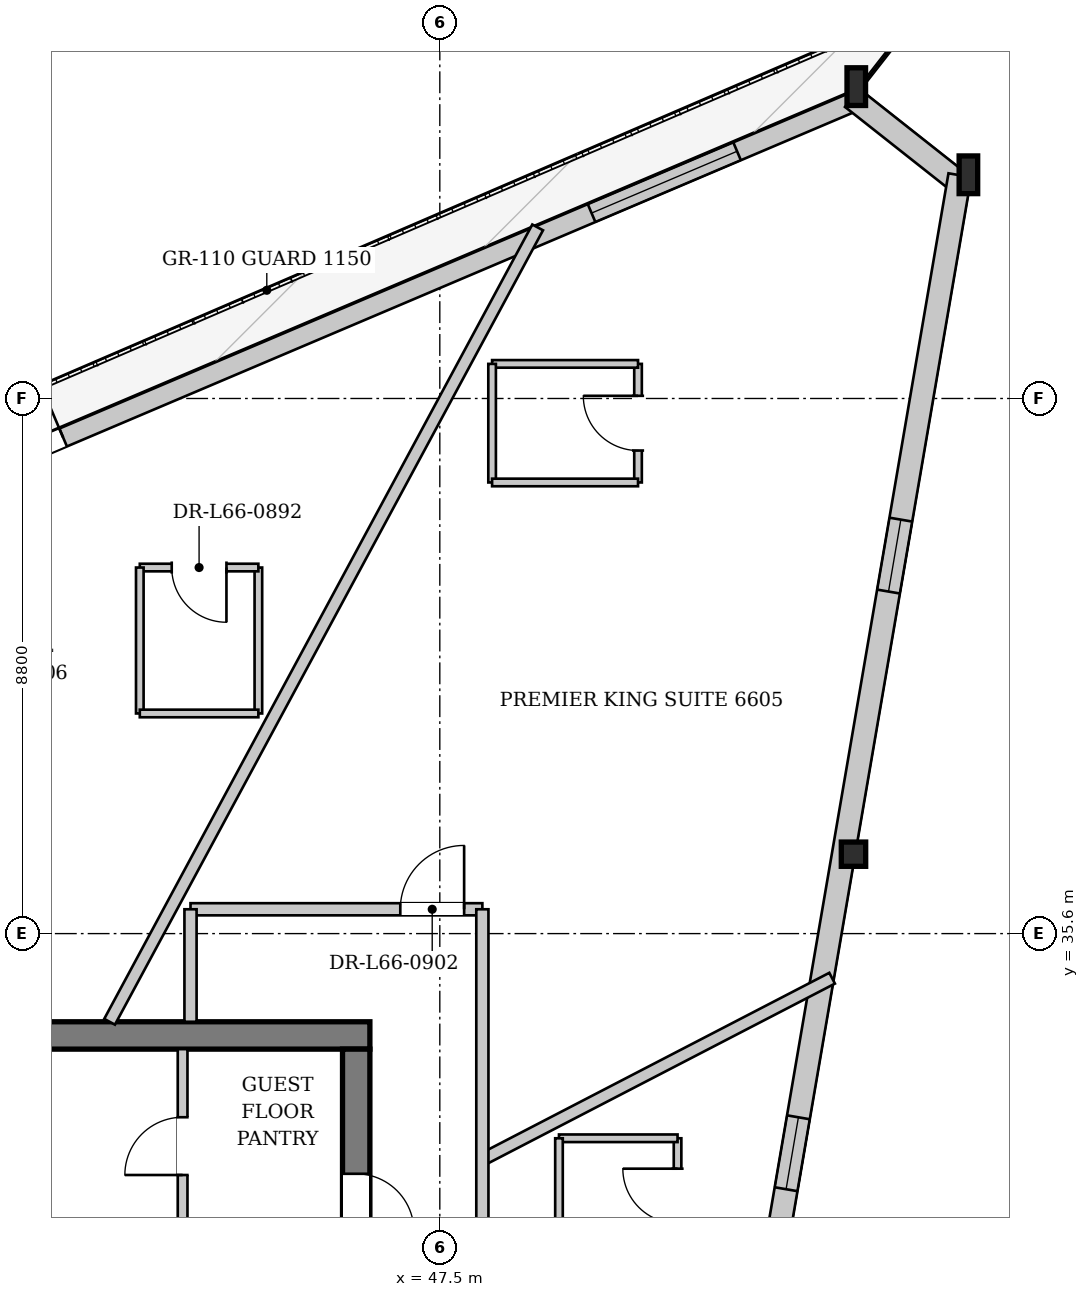
"""IFC4 building model, lengths in metres.
Left out: names, types, materials, properties, quantities, classifications, styles, units other than length and angle.
Written with IfcOpenShell. Run it as: python <this file> out.ifc"""

import sys

from ifc_helpers import new_model, si_unit, direction, frame, frame_2d, origin, origin_2d, place, context, subcontext, project, spatial, rectangle, i_section, extrude, source, transform, mapped, element, fill, save


model = new_model("IFC4")
c1 = context("Model", 3, precision=1e-05, world=origin(), true_north=direction((0.0, 1.0)))
c2 = subcontext(c1, "Body", "Model", "MODEL_VIEW")
j1 = project(units=[si_unit("LENGTHUNIT", "METRE"), si_unit("PLANEANGLEUNIT", "RADIAN")], contexts=[c1])
p1 = place(None, origin())
s1 = spatial("IfcSite", under=j1, at=p1, CompositionType="ELEMENT")
p2 = place(p1, origin())
s2 = spatial("IfcBuilding", under=s1, at=p2, CompositionType="ELEMENT")
p3 = place(p2, frame((0.0, 0.0, 248.9)))
s3 = spatial("IfcBuildingStorey", under=s2, at=p3, CompositionType="ELEMENT", Elevation=248.9)
m1 = source(origin(), c2, "Body", "SweptSolid", [
    extrude(i_section(OverallWidth=0.305, OverallDepth=0.62, WebThickness=0.021, FlangeThickness=0.04, at=origin_2d()), origin(), (0.0, 0.0, 1.0), 3.437),
])
for number, where, z_axis, x_axis in (
    (1, (56.24, 48.039, 0.0), (-0.027, 0.023, 0.999), (-0.646, -0.763, 0.0)),
    (2, (54.399, 49.493, 0.0), (-0.029, 0.021, 0.999), (-0.58, -0.815, 0.0)),
):
    element("IfcColumn", number, at=place(p3, frame(where, z_axis=z_axis, x_axis=x_axis)), inside=s3, PredefinedType="COLUMN", context=c2, shape_type="MappedRepresentation", body=[
        mapped(m1, transform((0.0, 0.0, 0.0), x_axis=(1.0, 0.0, 0.0), y_axis=(0.0, 1.0, 0.0), z_axis=(0.0, 0.0, 1.0), scale=1.0)),
    ])
m2 = source(origin(), c2, "Body", "SweptSolid", [
    extrude(i_section(OverallWidth=0.401, OverallDepth=0.399, WebThickness=0.022, FlangeThickness=0.034, at=origin_2d()), origin(), (0.0, 0.0, 1.0), 3.436),
])
p4 = place(p3, frame((54.326, 36.87, 0.0), z_axis=(-0.013073556302, 0.020676113499, 0.999700745451), x_axis=(-0.8452127177, -0.534430034559, 0.0)))
e3 = element("IfcColumn", 3, at=p4, inside=s3, PredefinedType="COLUMN", context=c2, shape_type="MappedRepresentation", body=[
    mapped(m2, transform((0.0, 0.0, 0.0), x_axis=(1.0, 0.0, 0.0), y_axis=(0.0, 1.0, 0.0), z_axis=(0.0, 0.0, 1.0), scale=1.0)),
])
p5 = place(p3, frame((34.098, 40.698, 0.0), z_axis=(0.0, 0.0, 1.0), x_axis=(0.920439131347, 0.390885923877, 0.0)))
e4 = element("IfcWall", 4, at=p5, inside=s3, PredefinedType="SOLIDWALL", context=c2, shape_type="SweptSolid", body=[
    extrude(rectangle(XDim=22.124, YDim=0.32, at=frame_2d((11.062, 0.0))), origin(), (0.0, 0.0, 1.0), 2.872),
])
p6 = place(p5, frame((6.33, 0.0, 0.0)))
e5 = element("IfcOpeningElement", 5, at=p6, cuts=e4, PredefinedType="OPENING", context=c2, shape_type="SweptSolid", body=[
    extrude(rectangle(XDim=1.5, YDim=2.3, at=frame_2d((0.75, 1.15))), frame((0.0, 0.17, 0.0), z_axis=(0.0, -1.0, 0.0), x_axis=(1.0, 0.0, 0.0)), (0.0, 0.0, 1.0), 0.34),
])
p7 = place(p5, frame((17.272, 0.0, 0.402)))
e6 = element("IfcOpeningElement", 6, at=p7, cuts=e4, PredefinedType="OPENING", context=c2, shape_type="SweptSolid", body=[
    extrude(rectangle(XDim=2.6, YDim=2.35, at=frame_2d((1.3, 1.175))), frame((0.0, 0.17, 0.0), z_axis=(0.0, -1.0, 0.0), x_axis=(1.0, 0.0, 0.0)), (0.0, 0.0, 1.0), 0.34),
])
p8 = place(p3, frame((54.281, 49.344, 0.0), z_axis=(0.0, 0.0, 1.0), x_axis=(0.784802840653, -0.619745513339, 0.0)))
e7 = element("IfcWall", 7, at=p8, inside=s3, PredefinedType="SOLIDWALL", context=c2, shape_type="SweptSolid", body=[
    extrude(rectangle(XDim=2.346, YDim=0.38, at=frame_2d((1.173, 0.0))), origin(), (0.0, 0.0, 1.0), 2.872),
])
p9 = place(p3, frame((56.053, 48.071, 0.0), z_axis=(0.0, 0.0, 1.0), x_axis=(-0.168923450159, -0.985629173668, 0.0)))
e8 = element("IfcWall", 8, at=p9, inside=s3, PredefinedType="SOLIDWALL", context=c2, shape_type="SweptSolid", body=[
    extrude(rectangle(XDim=22.663, YDim=0.38, at=frame_2d((11.332, 0.0))), origin(), (0.0, 0.0, 1.0), 2.872),
])
p10 = place(p9, frame((5.746, 0.0, 0.65)))
e9 = element("IfcOpeningElement", 9, at=p10, cuts=e8, PredefinedType="OPENING", context=c2, shape_type="SweptSolid", body=[
    extrude(rectangle(XDim=1.2, YDim=1.5, at=frame_2d((0.6, 0.75))), frame((0.0, 0.2, 0.0), z_axis=(0.0, -1.0, 0.0), x_axis=(1.0, 0.0, 0.0)), (0.0, 0.0, 1.0), 0.4),
])
p11 = place(p9, frame((15.718, 0.0, 0.65)))
e10 = element("IfcOpeningElement", 10, at=p11, cuts=e8, PredefinedType="OPENING", context=c2, shape_type="SweptSolid", body=[
    extrude(rectangle(XDim=1.2, YDim=1.5, at=frame_2d((0.6, 0.75))), frame((0.0, 0.2, 0.0), z_axis=(0.0, -1.0, 0.0), x_axis=(1.0, 0.0, 0.0)), (0.0, 0.0, 1.0), 0.4),
])
p12 = place(p3, frame((29.65, 33.925, 0.0), z_axis=(0.0, 0.0, 1.0), x_axis=(1.0, 0.0, 0.0)))
e11 = element("IfcWall", 11, at=p12, inside=s3, PredefinedType="SHEAR", context=c2, shape_type="SweptSolid", body=[
    extrude(rectangle(XDim=16.7, YDim=0.45, at=frame_2d((8.35, 0.0))), origin(), (0.0, 0.0, 1.0), 3.38),
])
p13 = place(p12, frame((1.45, 0.0, 0.0)))
e12 = element("IfcOpeningElement", 12, at=p13, cuts=e11, PredefinedType="OPENING", context=c2, shape_type="SweptSolid", body=[
    extrude(rectangle(XDim=0.95, YDim=2.1, at=frame_2d((0.475, 1.05))), frame((0.0, 0.235, 0.0), z_axis=(0.0, -1.0, 0.0), x_axis=(1.0, 0.0, 0.0)), (0.0, 0.0, 1.0), 0.47),
])
p14 = place(p12, frame((3.83, 0.0, 0.0)))
e13 = element("IfcOpeningElement", 13, at=p14, cuts=e11, PredefinedType="OPENING", context=c2, shape_type="SweptSolid", body=[
    extrude(rectangle(XDim=1.32, YDim=2.2, at=frame_2d((0.66, 1.1))), frame((0.0, 0.235, 0.0), z_axis=(0.0, -1.0, 0.0), x_axis=(1.0, 0.0, 0.0)), (0.0, 0.0, 1.0), 0.47),
])
p15 = place(p3, frame((46.125, 33.7, 0.0), z_axis=(0.0, 0.0, 1.0), x_axis=(0.0, -1.0, 0.0)))
e14 = element("IfcWall", 14, at=p15, inside=s3, PredefinedType="SHEAR", context=c2, shape_type="SweptSolid", body=[
    extrude(rectangle(XDim=14.2, YDim=0.45, at=frame_2d((7.1, 0.0))), origin(), (0.0, 0.0, 1.0), 3.38),
])
p16 = place(p15, frame((5.18, 0.0, 0.0)))
e15 = element("IfcOpeningElement", 15, at=p16, cuts=e14, PredefinedType="OPENING", context=c2, shape_type="SweptSolid", body=[
    extrude(rectangle(XDim=1.6, YDim=2.2, at=frame_2d((0.8, 1.1))), frame((0.0, 0.235, 0.0), z_axis=(0.0, -1.0, 0.0), x_axis=(1.0, 0.0, 0.0)), (0.0, 0.0, 1.0), 0.47),
])
p17 = place(p15, frame((2.05, 0.0, 0.0)))
e16 = element("IfcOpeningElement", 16, at=p17, cuts=e14, PredefinedType="OPENING", context=c2, shape_type="SweptSolid", body=[
    extrude(rectangle(XDim=0.95, YDim=2.1, at=frame_2d((0.475, 1.05))), frame((0.0, 0.235, 0.0), z_axis=(0.0, -1.0, 0.0), x_axis=(1.0, 0.0, 0.0)), (0.0, 0.0, 1.0), 0.47),
])
p18 = place(p3, frame((43.27, 30.68, 0.0), z_axis=(0.0, 0.0, 1.0), x_axis=(0.0, 1.0, 0.0)))
e17 = element("IfcWall", 17, at=p18, inside=s3, PredefinedType="PARTITIONING", context=c2, shape_type="SweptSolid", body=[
    extrude(rectangle(XDim=3.02, YDim=0.16, at=frame_2d((1.51, 0.0))), origin(), (0.0, 0.0, 1.0), 3.38),
])
p19 = place(p18, frame((0.95, 0.0, 0.0)))
e18 = element("IfcOpeningElement", 18, at=p19, cuts=e17, PredefinedType="OPENING", context=c2, shape_type="SweptSolid", body=[
    extrude(rectangle(XDim=0.95, YDim=2.1, at=frame_2d((0.475, 1.05))), frame((0.0, 0.09, 0.0), z_axis=(0.0, -1.0, 0.0), x_axis=(1.0, 0.0, 0.0)), (0.0, 0.0, 1.0), 0.18),
])
p20 = place(p3, frame((48.2, 31.885, 0.0), z_axis=(0.0, 0.0, 1.0), x_axis=(0.887874845761, 0.460085055468, 0.0)))
e19 = element("IfcWall", 19, at=p20, inside=s3, PredefinedType="PARTITIONING", context=c2, shape_type="SweptSolid", body=[
    extrude(rectangle(XDim=6.479, YDim=0.2, at=frame_2d((3.239, 0.0))), origin(), (0.0, 0.0, 1.0), 3.38),
])
p21 = place(p3, frame((42.069, 34.15, 0.0), z_axis=(0.0, 0.0, 1.0), x_axis=(0.474411767959, 0.880303058283, 0.0)))
e20 = element("IfcWall", 20, at=p21, inside=s3, PredefinedType="PARTITIONING", context=c2, shape_type="SweptSolid", body=[
    extrude(rectangle(XDim=14.84, YDim=0.2, at=frame_2d((7.42, 0.0))), origin(), (0.0, 0.0, 1.0), 3.38),
])
p22 = place(p3, frame((51.41, 30.334, 0.0), z_axis=(0.0, 0.0, 1.0), x_axis=(0.0, 1.0, 0.0)))
e21 = element("IfcWall", 21, at=p22, inside=s3, PredefinedType="PARTITIONING", context=c2, shape_type="SweptSolid", body=[
    extrude(rectangle(XDim=1.9, YDim=0.125, at=frame_2d((0.95, 0.0))), origin(), (0.0, 0.0, 1.0), 3.38),
])
p23 = place(p22, frame((0.5, 0.0, 0.0)))
e22 = element("IfcOpeningElement", 22, at=p23, cuts=e21, PredefinedType="OPENING", context=c2, shape_type="SweptSolid", body=[
    extrude(rectangle(XDim=0.9, YDim=2.1, at=frame_2d((0.45, 1.05))), frame((0.0, 0.073, 0.0), z_axis=(0.0, -1.0, 0.0), x_axis=(1.0, 0.0, 0.0)), (0.0, 0.0, 1.0), 0.145),
])
p24 = place(p3, frame((51.41, 32.234, 0.0), z_axis=(0.0, 0.0, 1.0), x_axis=(-1.0, 0.0, 0.0)))
e23 = element("IfcWall", 23, at=p24, inside=s3, PredefinedType="PARTITIONING", context=c2, shape_type="SweptSolid", body=[
    extrude(rectangle(XDim=1.95, YDim=0.125, at=frame_2d((0.975, 0.0))), origin(), (0.0, 0.0, 1.0), 3.38),
])
p25 = place(p3, frame((49.46, 32.234, 0.0), z_axis=(0.0, 0.0, 1.0), x_axis=(0.0, -1.0, 0.0)))
e24 = element("IfcWall", 24, at=p25, inside=s3, PredefinedType="PARTITIONING", context=c2, shape_type="SweptSolid", body=[
    extrude(rectangle(XDim=1.9, YDim=0.125, at=frame_2d((0.95, 0.0))), origin(), (0.0, 0.0, 1.0), 3.38),
])
p26 = place(p3, frame((50.76, 43.019, 0.0), z_axis=(0.0, 0.0, 1.0), x_axis=(0.0, 1.0, 0.0)))
e25 = element("IfcWall", 25, at=p26, inside=s3, PredefinedType="PARTITIONING", context=c2, shape_type="SweptSolid", body=[
    extrude(rectangle(XDim=1.95, YDim=0.125, at=frame_2d((0.975, 0.0))), origin(), (0.0, 0.0, 1.0), 3.38),
])
p27 = place(p26, frame((0.525, 0.0, 0.0)))
e26 = element("IfcOpeningElement", 26, at=p27, cuts=e25, PredefinedType="OPENING", context=c2, shape_type="SweptSolid", body=[
    extrude(rectangle(XDim=0.9, YDim=2.1, at=frame_2d((0.45, 1.05))), frame((0.0, 0.073, 0.0), z_axis=(0.0, -1.0, 0.0), x_axis=(1.0, 0.0, 0.0)), (0.0, 0.0, 1.0), 0.145),
])
p28 = place(p3, frame((50.76, 44.969, 0.0), z_axis=(0.0, 0.0, 1.0), x_axis=(-1.0, 0.0, 0.0)))
e27 = element("IfcWall", 27, at=p28, inside=s3, PredefinedType="PARTITIONING", context=c2, shape_type="SweptSolid", body=[
    extrude(rectangle(XDim=2.4, YDim=0.125, at=frame_2d((1.2, 0.0))), origin(), (0.0, 0.0, 1.0), 3.38),
])
p29 = place(p3, frame((48.36, 44.969, 0.0), z_axis=(0.0, 0.0, 1.0), x_axis=(0.0, -1.0, 0.0)))
e28 = element("IfcWall", 28, at=p29, inside=s3, PredefinedType="PARTITIONING", context=c2, shape_type="SweptSolid", body=[
    extrude(rectangle(XDim=1.95, YDim=0.125, at=frame_2d((0.975, 0.0))), origin(), (0.0, 0.0, 1.0), 3.38),
])
p30 = place(p3, frame((48.36, 43.019, 0.0), z_axis=(0.0, 0.0, 1.0), x_axis=(1.0, 0.0, 0.0)))
e29 = element("IfcWall", 29, at=p30, inside=s3, PredefinedType="PARTITIONING", context=c2, shape_type="SweptSolid", body=[
    extrude(rectangle(XDim=2.4, YDim=0.125, at=frame_2d((1.2, 0.0))), origin(), (0.0, 0.0, 1.0), 3.125),
])
p31 = place(p3, frame((44.516, 39.22, 0.0), z_axis=(0.0, 0.0, 1.0), x_axis=(0.0, 1.0, 0.0)))
e30 = element("IfcWall", 30, at=p31, inside=s3, PredefinedType="PARTITIONING", context=c2, shape_type="SweptSolid", body=[
    extrude(rectangle(XDim=2.4, YDim=0.125, at=frame_2d((1.2, 0.0))), origin(), (0.0, 0.0, 1.0), 3.38),
])
p32 = place(p3, frame((44.516, 41.62, 0.0), z_axis=(0.0, 0.0, 1.0), x_axis=(-1.0, 0.0, 0.0)))
e31 = element("IfcWall", 31, at=p32, inside=s3, PredefinedType="PARTITIONING", context=c2, shape_type="SweptSolid", body=[
    extrude(rectangle(XDim=1.95, YDim=0.125, at=frame_2d((0.975, 0.0))), origin(), (0.0, 0.0, 1.0), 3.125),
])
p33 = place(p32, frame((0.525, 0.0, 0.0)))
e32 = element("IfcOpeningElement", 32, at=p33, cuts=e31, PredefinedType="OPENING", context=c2, shape_type="SweptSolid", body=[
    extrude(rectangle(XDim=0.9, YDim=2.1, at=frame_2d((0.45, 1.05))), frame((0.0, 0.073, 0.0), z_axis=(0.0, -1.0, 0.0), x_axis=(1.0, 0.0, 0.0)), (0.0, 0.0, 1.0), 0.145),
])
p34 = place(p3, frame((42.566, 41.62, 0.0), z_axis=(0.0, 0.0, 1.0), x_axis=(0.0, -1.0, 0.0)))
e33 = element("IfcWall", 33, at=p34, inside=s3, PredefinedType="PARTITIONING", context=c2, shape_type="SweptSolid", body=[
    extrude(rectangle(XDim=2.4, YDim=0.125, at=frame_2d((1.2, 0.0))), origin(), (0.0, 0.0, 1.0), 3.38),
])
p35 = place(p3, frame((42.566, 39.22, 0.0), z_axis=(0.0, 0.0, 1.0), x_axis=(1.0, 0.0, 0.0)))
e34 = element("IfcWall", 34, at=p35, inside=s3, PredefinedType="PARTITIONING", context=c2, shape_type="SweptSolid", body=[
    extrude(rectangle(XDim=1.95, YDim=0.125, at=frame_2d((0.975, 0.0))), origin(), (0.0, 0.0, 1.0), 3.38),
])
p36 = place(p3, frame((43.4, 36.0, 0.0), z_axis=(0.0, 0.0, 1.0), x_axis=(1.0, 0.0, 0.0)))
e35 = element("IfcWall", 35, at=p36, inside=s3, PredefinedType="PARTITIONING", context=c2, shape_type="SweptSolid", body=[
    extrude(rectangle(XDim=4.8, YDim=0.2, at=frame_2d((2.4, 0.0))), origin(), (0.0, 0.0, 1.0), 3.38),
])
p37 = place(p36, frame((3.45, 0.0, 0.0)))
e36 = element("IfcOpeningElement", 36, at=p37, cuts=e35, PredefinedType="OPENING", context=c2, shape_type="SweptSolid", body=[
    extrude(rectangle(XDim=1.05, YDim=2.2, at=frame_2d((0.525, 1.1))), frame((0.0, 0.11, 0.0), z_axis=(0.0, -1.0, 0.0), x_axis=(1.0, 0.0, 0.0)), (0.0, 0.0, 1.0), 0.22),
])
p38 = place(p3, frame((43.4, 34.15, 0.0), z_axis=(0.0, 0.0, 1.0), x_axis=(0.0, 1.0, 0.0)))
e37 = element("IfcWall", 37, at=p38, inside=s3, PredefinedType="PARTITIONING", context=c2, shape_type="SweptSolid", body=[
    extrude(rectangle(XDim=1.85, YDim=0.2, at=frame_2d((0.925, 0.0))), origin(), (0.0, 0.0, 1.0), 3.38),
])
p39 = place(p3, frame((48.2, 17.2, 0.0), z_axis=(0.0, 0.0, 1.0), x_axis=(0.0, 1.0, 0.0)))
e38 = element("IfcWall", 38, at=p39, inside=s3, PredefinedType="PARTITIONING", context=c2, shape_type="SweptSolid", body=[
    extrude(rectangle(XDim=18.8, YDim=0.2, at=frame_2d((9.4, 0.0))), origin(), (0.0, 0.0, 1.0), 3.065),
])
p40 = place(p39, frame((3.537, 0.0, 0.0)))
e39 = element("IfcOpeningElement", 39, at=p40, cuts=e38, PredefinedType="OPENING", context=c2, shape_type="SweptSolid", body=[
    extrude(rectangle(XDim=1.05, YDim=2.2, at=frame_2d((0.525, 1.1))), frame((0.0, 0.11, 0.0), z_axis=(0.0, -1.0, 0.0), x_axis=(1.0, 0.0, 0.0)), (0.0, 0.0, 1.0), 0.22),
])
p41 = place(p39, frame((10.296, 0.0, 0.0)))
e40 = element("IfcOpeningElement", 40, at=p41, cuts=e38, PredefinedType="OPENING", context=c2, shape_type="SweptSolid", body=[
    extrude(rectangle(XDim=1.05, YDim=2.2, at=frame_2d((0.525, 1.1))), frame((0.0, 0.11, 0.0), z_axis=(0.0, -1.0, 0.0), x_axis=(1.0, 0.0, 0.0)), (0.0, 0.0, 1.0), 0.22),
])
m3 = source(origin(), c2, "Body", "SweptSolid", [
    extrude(rectangle(XDim=1.5, YDim=2.3, at=frame_2d((0.75, 1.15))), frame((0.0, 0.025, 0.0), z_axis=(0.0, -1.0, 0.0), x_axis=(1.0, 0.0, 0.0)), (0.0, 0.0, 1.0), 0.05),
])
p42 = place(p6, origin())
e41 = element("IfcDoor", 41, at=p42, inside=s3, OperationType="DOUBLE_DOOR_SINGLE_SWING", PredefinedType="DOOR", context=c2, shape_type="MappedRepresentation", body=[
    mapped(m3, transform((0.0, 0.0, 0.0), x_axis=(1.0, 0.0, 0.0), y_axis=(0.0, 1.0, 0.0), z_axis=(0.0, 0.0, 1.0), scale=1.0)),
])
fill(e5, e41)
m4 = source(origin(), c2, "Body", "SweptSolid", [
    extrude(rectangle(XDim=2.6, YDim=2.35, at=frame_2d((1.3, 1.175))), frame((0.0, 0.03, 0.0), z_axis=(0.0, -1.0, 0.0), x_axis=(1.0, 0.0, 0.0)), (0.0, 0.0, 1.0), 0.06),
])
p43 = place(p7, origin())
e42 = element("IfcWindow", 42, at=p43, inside=s3, PartitioningType="SINGLE_PANEL", PredefinedType="WINDOW", context=c2, shape_type="MappedRepresentation", body=[
    mapped(m4, transform((0.0, 0.0, 0.0), x_axis=(1.0, 0.0, 0.0), y_axis=(0.0, 1.0, 0.0), z_axis=(0.0, 0.0, 1.0), scale=1.0)),
])
fill(e6, e42)
m5 = source(origin(), c2, "Body", "SweptSolid", [
    extrude(rectangle(XDim=1.2, YDim=1.5, at=frame_2d((0.6, 0.75))), frame((0.0, 0.03, 0.0), z_axis=(0.0, -1.0, 0.0), x_axis=(1.0, 0.0, 0.0)), (0.0, 0.0, 1.0), 0.06),
])
p44 = place(p10, origin())
e43 = element("IfcWindow", 43, at=p44, inside=s3, PartitioningType="SINGLE_PANEL", PredefinedType="WINDOW", context=c2, shape_type="MappedRepresentation", body=[
    mapped(m5, transform((0.0, 0.0, 0.0), x_axis=(1.0, 0.0, 0.0), y_axis=(0.0, 1.0, 0.0), z_axis=(0.0, 0.0, 1.0), scale=1.0)),
])
fill(e9, e43)
p45 = place(p11, origin())
e44 = element("IfcWindow", 44, at=p45, inside=s3, PartitioningType="SINGLE_PANEL", PredefinedType="WINDOW", context=c2, shape_type="MappedRepresentation", body=[
    mapped(m5, transform((0.0, 0.0, 0.0), x_axis=(1.0, 0.0, 0.0), y_axis=(0.0, 1.0, 0.0), z_axis=(0.0, 0.0, 1.0), scale=1.0)),
])
fill(e10, e44)
m6 = source(origin(), c2, "Body", "SweptSolid", [
    extrude(rectangle(XDim=0.95, YDim=2.1, at=frame_2d((0.475, 1.05))), frame((0.0, 0.025, 0.0), z_axis=(0.0, -1.0, 0.0), x_axis=(1.0, 0.0, 0.0)), (0.0, 0.0, 1.0), 0.05),
])
p46 = place(p19, origin())
e45 = element("IfcDoor", 45, at=p46, inside=s3, OperationType="SINGLE_SWING_LEFT", PredefinedType="DOOR", context=c2, shape_type="MappedRepresentation", body=[
    mapped(m6, transform((0.0, 0.0, 0.0), x_axis=(1.0, 0.0, 0.0), y_axis=(0.0, 1.0, 0.0), z_axis=(0.0, 0.0, 1.0), scale=1.0)),
])
fill(e18, e45)
p47 = place(p17, origin())
e46 = element("IfcDoor", 46, at=p47, inside=s3, OperationType="SINGLE_SWING_RIGHT", PredefinedType="DOOR", context=c2, shape_type="MappedRepresentation", body=[
    mapped(m6, transform((0.0, 0.0, 0.0), x_axis=(1.0, 0.0, 0.0), y_axis=(0.0, 1.0, 0.0), z_axis=(0.0, 0.0, 1.0), scale=1.0)),
])
fill(e16, e46)
m7 = source(origin(), c2, "Body", "SweptSolid", [
    extrude(rectangle(XDim=0.9, YDim=2.1, at=frame_2d((0.45, 1.05))), frame((0.0, 0.025, 0.0), z_axis=(0.0, -1.0, 0.0), x_axis=(1.0, 0.0, 0.0)), (0.0, 0.0, 1.0), 0.05),
])
p48 = place(p23, origin())
e47 = element("IfcDoor", 47, at=p48, inside=s3, OperationType="SINGLE_SWING_RIGHT", PredefinedType="DOOR", context=c2, shape_type="MappedRepresentation", body=[
    mapped(m7, transform((0.0, 0.0, 0.0), x_axis=(1.0, 0.0, 0.0), y_axis=(0.0, 1.0, 0.0), z_axis=(0.0, 0.0, 1.0), scale=1.0)),
])
fill(e22, e47)
p49 = place(p27, origin())
e48 = element("IfcDoor", 48, at=p49, inside=s3, OperationType="SINGLE_SWING_RIGHT", PredefinedType="DOOR", context=c2, shape_type="MappedRepresentation", body=[
    mapped(m7, transform((0.0, 0.0, 0.0), x_axis=(1.0, 0.0, 0.0), y_axis=(0.0, 1.0, 0.0), z_axis=(0.0, 0.0, 1.0), scale=1.0)),
])
fill(e26, e48)
p50 = place(p33, origin())
e49 = element("IfcDoor", 49, at=p50, inside=s3, OperationType="SINGLE_SWING_LEFT", PredefinedType="DOOR", context=c2, shape_type="MappedRepresentation", body=[
    mapped(m7, transform((0.0, 0.0, 0.0), x_axis=(1.0, 0.0, 0.0), y_axis=(0.0, 1.0, 0.0), z_axis=(0.0, 0.0, 1.0), scale=1.0)),
])
fill(e32, e49)
m8 = source(origin(), c2, "Body", "SweptSolid", [
    extrude(rectangle(XDim=1.05, YDim=2.2, at=frame_2d((0.525, 1.1))), frame((0.0, 0.025, 0.0), z_axis=(0.0, -1.0, 0.0), x_axis=(1.0, 0.0, 0.0)), (0.0, 0.0, 1.0), 0.05),
])
p51 = place(p37, origin())
e50 = element("IfcDoor", 50, at=p51, inside=s3, OperationType="SINGLE_SWING_RIGHT", PredefinedType="DOOR", context=c2, shape_type="MappedRepresentation", body=[
    mapped(m8, transform((0.0, 0.0, 0.0), x_axis=(1.0, 0.0, 0.0), y_axis=(0.0, 1.0, 0.0), z_axis=(0.0, 0.0, 1.0), scale=1.0)),
])
fill(e36, e50)
save(model, sys.argv[1])
